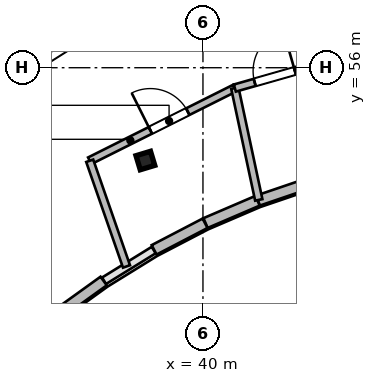
"""IFC4 building model, lengths in metres.
Left out: names, types, materials, properties, quantities, classifications, styles, units other than length and angle.
Written with IfcOpenShell. Run it as: python <this file> out.ifc"""

import sys

from ifc_helpers import new_model, si_unit, direction, frame, frame_2d, origin, origin_2d, place, context, subcontext, project, spatial, rectangle, i_section, extrude, source, transform, mapped, element, fill, save


model = new_model("IFC4")
c1 = context("Model", 3, precision=1e-05, world=origin(), true_north=direction((0.0, 1.0)))
c2 = subcontext(c1, "Body", "Model", "MODEL_VIEW")
j1 = project(units=[si_unit("LENGTHUNIT", "METRE"), si_unit("PLANEANGLEUNIT", "RADIAN")], contexts=[c1])
p1 = place(None, origin())
s1 = spatial("IfcSite", under=j1, at=p1, CompositionType="ELEMENT")
p2 = place(p1, origin())
s2 = spatial("IfcBuilding", under=s1, at=p2, CompositionType="ELEMENT")
p3 = place(p2, frame((0.0, 0.0, 283.5)))
s3 = spatial("IfcBuildingStorey", under=s2, at=p3, CompositionType="ELEMENT", Elevation=283.5)
m1 = source(origin(), c2, "Body", "SweptSolid", [
    extrude(i_section(OverallWidth=0.399, OverallDepth=0.387, WebThickness=0.021, FlangeThickness=0.033, at=origin_2d()), origin(), (0.0, 0.0, 1.0), 3.9),
])
p4 = place(p3, frame((38.485, 53.558, 0.0), z_axis=(0.0, 0.0, 1.0), x_axis=(-0.288697611798, 0.957420330337, 0.0)))
e1 = element("IfcColumn", 1, at=p4, inside=s3, PredefinedType="COLUMN", context=c2, shape_type="MappedRepresentation", body=[
    mapped(m1, transform((0.0, 0.0, 0.0), scale=1.0)),
])
m2 = source(origin(), c2, "Body", "SweptSolid", [
    extrude(rectangle(XDim=1.473, YDim=0.28, at=frame_2d((0.736, 0.0))), origin(), (0.0, 0.0, 1.0), 3.64),
])
p5 = place(p3, frame((42.845, 52.979, 0.0), z_axis=(0.0, 0.0, 1.0), x_axis=(-0.946641296917, -0.322289086026, 0.0)))
e2 = element("IfcWall", 2, at=p5, inside=s3, PredefinedType="SOLIDWALL", context=c2, shape_type="MappedRepresentation", body=[
    mapped(m2, transform((0.0, 0.0, 0.0), scale=1.0)),
])
m3 = source(origin(), c2, "Body", "SweptSolid", [
    extrude(rectangle(XDim=1.49, YDim=0.28, at=frame_2d((0.745, 0.0))), origin(), (0.0, 0.0, 1.0), 3.64),
])
p6 = place(p3, frame((41.438, 52.5, 0.0), z_axis=(0.0, 0.0, 1.0), x_axis=(-0.919009427656, -0.394235553799, 0.0)))
e3 = element("IfcWall", 3, at=p6, inside=s3, PredefinedType="SOLIDWALL", context=c2, shape_type="MappedRepresentation", body=[
    mapped(m3, transform((0.0, 0.0, 0.0), scale=1.0)),
])
m4 = source(origin(), c2, "Body", "SweptSolid", [
    extrude(rectangle(XDim=1.512, YDim=0.28, at=frame_2d((0.756, 0.0))), origin(), (0.0, 0.0, 1.0), 3.64),
])
p7 = place(p3, frame((40.056, 51.906, 0.0), z_axis=(0.0, 0.0, 1.0), x_axis=(-0.886841011195, -0.462074691865, 0.0)))
e4 = element("IfcWall", 4, at=p7, inside=s3, PredefinedType="SOLIDWALL", context=c2, shape_type="MappedRepresentation", body=[
    mapped(m4, transform((0.0, 0.0, 0.0), scale=1.0)),
])
m5 = source(origin(), c2, "Body", "SweptSolid", [
    extrude(rectangle(XDim=1.561, YDim=0.28, at=frame_2d((0.781, 0.0))), origin(), (0.0, 0.0, 1.0), 3.64),
])
p8 = place(p3, frame((37.387, 50.387, 0.0), z_axis=(0.0, 0.0, 1.0), x_axis=(-0.81154027425, -0.584296485758, 0.0)))
e5 = element("IfcWall", 5, at=p8, inside=s3, PredefinedType="SOLIDWALL", context=c2, shape_type="MappedRepresentation", body=[
    mapped(m5, transform((0.0, 0.0, 0.0), scale=1.0)),
])
m6 = source(origin(), c2, "Body", "SweptSolid", [
    extrude(rectangle(XDim=4.271, YDim=0.195, at=frame_2d((2.135, 0.0))), origin(), (0.0, 0.0, 1.0), 3.64),
])
p9 = place(p3, frame((37.021, 53.552, 0.0), z_axis=(0.0, 0.0, 1.0), x_axis=(0.894061035522, 0.447945158207, 0.0)))
e6 = element("IfcWall", 6, at=p9, inside=s3, PredefinedType="PARTITIONING", context=c2, shape_type="MappedRepresentation", body=[
    mapped(m6, transform((0.0, 0.0, 0.0), scale=1.0)),
])
p10 = place(p9, frame((1.785, 0.0, 0.0)))
e7 = element("IfcOpeningElement", 7, at=p10, cuts=e6, PredefinedType="OPENING", context=c2, shape_type="SweptSolid", body=[
    extrude(rectangle(XDim=1.1, YDim=2.15, at=frame_2d((0.55, 1.075))), frame((0.0, 0.107, 0.0), z_axis=(0.0, -1.0, 0.0), x_axis=(1.0, 0.0, 0.0)), (0.0, 0.0, 1.0), 0.215),
])
m7 = source(origin(), c2, "Body", "SweptSolid", [
    extrude(rectangle(XDim=2.944, YDim=0.195, at=frame_2d((1.472, 0.0))), origin(), (0.0, 0.0, 1.0), 3.64),
])
p11 = place(p3, frame((37.988, 50.771, 0.0), z_axis=(0.0, 0.0, 1.0), x_axis=(-0.328565655286, 0.944481132774, 0.0)))
e8 = element("IfcWall", 8, at=p11, inside=s3, PredefinedType="PARTITIONING", context=c2, shape_type="MappedRepresentation", body=[
    mapped(m7, transform((0.0, 0.0, 0.0), scale=1.0)),
])
m8 = source(origin(), c2, "Body", "SweptSolid", [
    extrude(rectangle(XDim=3.01, YDim=0.195, at=frame_2d((1.505, 0.0))), origin(), (0.0, 0.0, 1.0), 3.64),
])
p12 = place(p3, frame((41.469, 52.521, 0.0), z_axis=(0.0, 0.0, 1.0), x_axis=(-0.209279797988, 0.977855800287, 0.0)))
e9 = element("IfcWall", 9, at=p12, inside=s3, PredefinedType="PARTITIONING", context=c2, shape_type="MappedRepresentation", body=[
    mapped(m8, transform((0.0, 0.0, 0.0), scale=1.0)),
])
m9 = source(origin(), c2, "Body", "SweptSolid", [
    extrude(rectangle(XDim=3.687, YDim=0.195, at=frame_2d((1.843, 0.0))), origin(), (0.0, 0.0, 1.0), 3.64),
])
p13 = place(p3, frame((40.839, 55.465, 0.0), z_axis=(0.0, 0.0, 1.0), x_axis=(0.961753532248, 0.27391630694, 0.0)))
e10 = element("IfcWall", 10, at=p13, inside=s3, PredefinedType="PARTITIONING", context=c2, shape_type="MappedRepresentation", body=[
    mapped(m9, transform((0.0, 0.0, 0.0), scale=1.0)),
])
p14 = place(p13, frame((0.543, 0.0, 0.0)))
e11 = element("IfcOpeningElement", 11, at=p14, cuts=e10, PredefinedType="OPENING", context=c2, shape_type="SweptSolid", body=[
    extrude(rectangle(XDim=1.1, YDim=2.15, at=frame_2d((0.55, 1.075))), frame((0.0, 0.107, 0.0), z_axis=(0.0, -1.0, 0.0), x_axis=(1.0, 0.0, 0.0)), (0.0, 0.0, 1.0), 0.215),
])
m10 = source(origin(), c2, "Body", "SweptSolid", [
    extrude(rectangle(XDim=5.025, YDim=0.195, at=frame_2d((2.513, 0.0))), origin(), (0.0, 0.0, 1.0), 3.64),
])
p15 = place(p3, frame((33.82, 54.911, 0.0), z_axis=(0.0, 0.0, 1.0), x_axis=(0.84532378062, 0.534254345717, 0.0)))
e12 = element("IfcWall", 12, at=p15, inside=s3, PredefinedType="PARTITIONING", context=c2, shape_type="MappedRepresentation", body=[
    mapped(m10, transform((0.0, 0.0, 0.0), scale=1.0)),
])
p16 = place(p15, frame((1.913, 0.0, 0.0)))
e13 = element("IfcOpeningElement", 13, at=p16, cuts=e12, PredefinedType="OPENING", context=c2, shape_type="SweptSolid", body=[
    extrude(rectangle(XDim=1.2, YDim=2.15, at=frame_2d((0.6, 1.075))), frame((0.0, 0.107, 0.0), z_axis=(0.0, -1.0, 0.0), x_axis=(1.0, 0.0, 0.0)), (0.0, 0.0, 1.0), 0.215),
])
m11 = source(origin(), c2, "Body", "SweptSolid", [
    extrude(rectangle(XDim=1.1, YDim=2.15, at=frame_2d((0.55, 1.075))), frame((0.0, 0.025, 0.0), z_axis=(0.0, -1.0, 0.0), x_axis=(1.0, 0.0, 0.0)), (0.0, 0.0, 1.0), 0.05),
])
p17 = place(p10, origin())
e14 = element("IfcDoor", 14, at=p17, inside=s3, OperationType="SINGLE_SWING_LEFT", PredefinedType="DOOR", context=c2, shape_type="MappedRepresentation", body=[
    mapped(m11, transform((0.0, 0.0, 0.0), scale=1.0)),
])
fill(e7, e14)
p18 = place(p14, origin())
e15 = element("IfcDoor", 15, at=p18, inside=s3, OperationType="SINGLE_SWING_RIGHT", PredefinedType="DOOR", context=c2, shape_type="MappedRepresentation", body=[
    mapped(m11, transform((0.0, 0.0, 0.0), scale=1.0)),
])
fill(e11, e15)
m12 = source(origin(), c2, "Body", "SweptSolid", [
    extrude(rectangle(XDim=1.2, YDim=2.15, at=frame_2d((0.6, 1.075))), frame((0.0, 0.025, 0.0), z_axis=(0.0, -1.0, 0.0), x_axis=(1.0, 0.0, 0.0)), (0.0, 0.0, 1.0), 0.05),
])
p19 = place(p16, origin())
e16 = element("IfcDoor", 16, at=p19, inside=s3, OperationType="SINGLE_SWING_RIGHT", PredefinedType="DOOR", context=c2, shape_type="MappedRepresentation", body=[
    mapped(m12, transform((0.0, 0.0, 0.0), scale=1.0)),
])
fill(e13, e16)
save(model, sys.argv[1])
